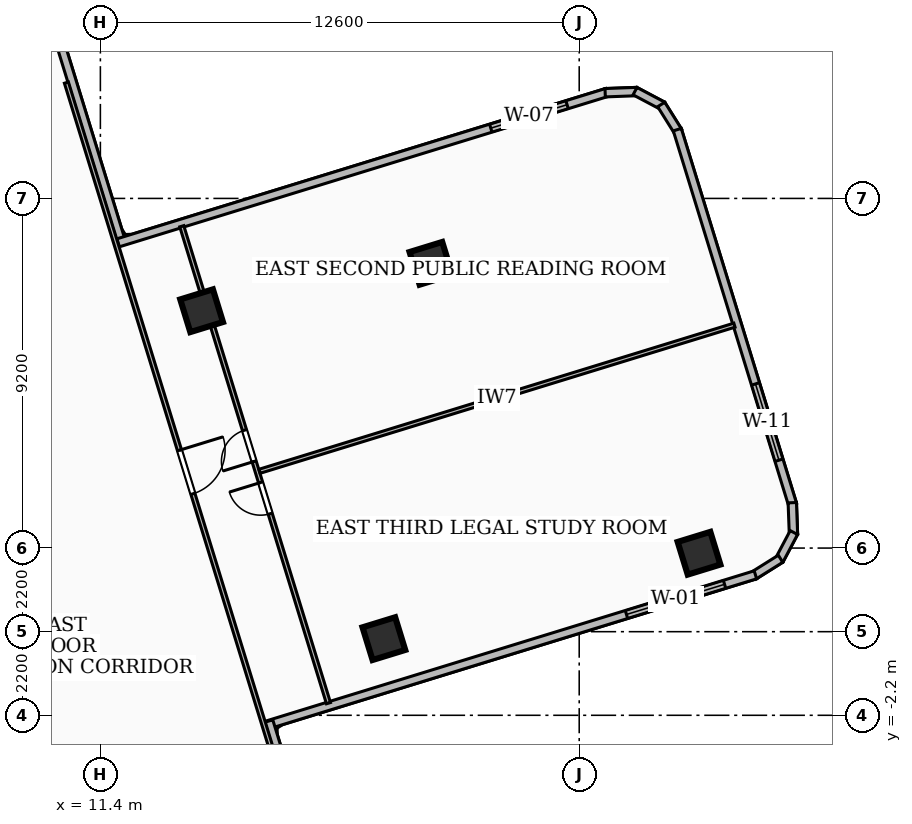
"""IFC4 building model, lengths in metres.
Left out: names, types, materials, properties, quantities, classifications, styles, units other than length and angle.
Written with IfcOpenShell. Run it as: python <this file> out.ifc"""

import sys

from ifc_helpers import new_model, si_unit, direction, frame, frame_2d, origin, origin_2d, place, context, subcontext, project, spatial, rectangle, extrude, element, fill, save


model = new_model("IFC4")
c1 = context("Model", 3, precision=1e-05, world=origin(), true_north=direction((0.0, 1.0)))
c2 = subcontext(c1, "Body", "Model", "MODEL_VIEW")
j1 = project(units=[si_unit("LENGTHUNIT", "METRE"), si_unit("PLANEANGLEUNIT", "RADIAN")], contexts=[c1])
p1 = place(None, origin())
s1 = spatial("IfcSite", under=j1, at=p1, CompositionType="ELEMENT")
p2 = place(p1, origin())
s2 = spatial("IfcBuilding", under=s1, at=p2, CompositionType="ELEMENT")
p3 = place(p2, frame((0.0, 0.0, 148.68)))
s3 = spatial("IfcBuildingStorey", under=s2, at=p3, CompositionType="ELEMENT", Elevation=148.68)
for number, where, z_axis, x_axis in (
    (1, (18.86, -0.183, 0.0), (0.0, 0.0, 1.0), (0.956, 0.294, 0.0)),
    (2, (14.064, 8.445, 0.0), (0.0, 0.0, 1.0), (0.956, 0.294, 0.0)),
    (3, (27.153, 2.064, 0.0), (0.0, 0.0, 1.0), (0.956, 0.294, 0.0)),
    (4, (20.098, 9.692, 0.0), (0.0, 0.0, 1.0), (0.956, 0.294, 0.0)),
):
    element("IfcColumn", number, at=place(p3, frame(where, z_axis=z_axis, x_axis=x_axis)), inside=s3, PredefinedType="COLUMN", context=c2, shape_type="SweptSolid", body=[
        extrude(rectangle(XDim=0.9, YDim=0.9, at=origin_2d()), origin(), (0.0, 0.0, 1.0), 3.6),
    ])
p4 = place(p3, frame((9.991, 16.634, 0.0), z_axis=(0.0, 0.0, 1.0), x_axis=(0.294002082259, -0.955804779036, 0.0)))
e5 = element("IfcWall", 5, at=p4, inside=s3, PredefinedType="SOLIDWALL", context=c2, shape_type="SweptSolid", body=[
    extrude(rectangle(XDim=6.759, YDim=0.22, at=frame_2d((3.379, 0.0))), origin(), (0.0, 0.0, 1.0), 3.32),
])
p5 = place(p3, frame((11.868, 10.232, 0.0), z_axis=(0.0, 0.0, 1.0), x_axis=(0.955802538335, 0.29400936671, 0.0)))
e6 = element("IfcWall", 6, at=p5, inside=s3, PredefinedType="SOLIDWALL", context=c2, shape_type="SweptSolid", body=[
    extrude(rectangle(XDim=13.459, YDim=0.22, at=frame_2d((6.729, 0.0))), origin(), (0.0, 0.0, 1.0), 3.32),
])
p6 = place(p5, frame((10.259, 0.0, 0.85)))
e7 = element("IfcOpeningElement", 7, at=p6, cuts=e6, PredefinedType="OPENING", context=c2, shape_type="SweptSolid", body=[
    extrude(rectangle(XDim=2.1, YDim=1.8, at=frame_2d((1.05, 0.9))), frame((0.0, 0.12, 0.0), z_axis=(0.0, -1.0, 0.0), x_axis=(1.0, 0.0, 0.0)), (0.0, 0.0, 1.0), 0.24),
])
p7 = place(p3, frame((24.683, 14.181, 0.0), z_axis=(0.0, 0.0, 1.0), x_axis=(0.999307996296, 0.037195813461, 0.0)))
e8 = element("IfcWall", 8, at=p7, inside=s3, PredefinedType="SOLIDWALL", context=c2, shape_type="SweptSolid", body=[
    extrude(rectangle(XDim=0.833, YDim=0.22, at=frame_2d((0.417, 0.0))), origin(), (0.0, 0.0, 1.0), 3.32),
])
p8 = place(p3, frame((25.469, 14.223, 0.0), z_axis=(0.0, 0.0, 1.0), x_axis=(0.883570434709, -0.468298288389, 0.0)))
e9 = element("IfcWall", 9, at=p8, inside=s3, PredefinedType="SOLIDWALL", context=c2, shape_type="SweptSolid", body=[
    extrude(rectangle(XDim=0.82, YDim=0.22, at=frame_2d((0.41, 0.0))), origin(), (0.0, 0.0, 1.0), 3.32),
])
p9 = place(p3, frame((26.158, 13.872, 0.0), z_axis=(0.0, 0.0, 1.0), x_axis=(0.531050540535, -0.847340146221, 0.0)))
e10 = element("IfcWall", 10, at=p9, inside=s3, PredefinedType="SOLIDWALL", context=c2, shape_type="SweptSolid", body=[
    extrude(rectangle(XDim=0.834, YDim=0.22, at=frame_2d((0.417, 0.0))), origin(), (0.0, 0.0, 1.0), 3.32),
])
p10 = place(p3, frame((26.581, 13.21, 0.0), z_axis=(0.0, 0.0, 1.0), x_axis=(0.293957854703, -0.955818382151, 0.0)))
e11 = element("IfcWall", 11, at=p10, inside=s3, PredefinedType="SOLIDWALL", context=c2, shape_type="SweptSolid", body=[
    extrude(rectangle(XDim=10.321, YDim=0.22, at=frame_2d((5.161, 0.0))), origin(), (0.0, 0.0, 1.0), 3.32),
])
p11 = place(p10, frame((7.0, 0.0, 0.85)))
e12 = element("IfcOpeningElement", 12, at=p11, cuts=e11, PredefinedType="OPENING", context=c2, shape_type="SweptSolid", body=[
    extrude(rectangle(XDim=2.1, YDim=1.6, at=frame_2d((1.05, 0.8))), frame((0.0, 0.12, 0.0), z_axis=(0.0, -1.0, 0.0), x_axis=(1.0, 0.0, 0.0)), (0.0, 0.0, 1.0), 0.24),
])
p12 = place(p3, frame((29.607, 3.394, 0.0), z_axis=(0.0, 0.0, 1.0), x_axis=(0.037195813461, -0.999307996296, 0.0)))
e13 = element("IfcWall", 13, at=p12, inside=s3, PredefinedType="SOLIDWALL", context=c2, shape_type="SweptSolid", body=[
    extrude(rectangle(XDim=0.833, YDim=0.22, at=frame_2d((0.417, 0.0))), origin(), (0.0, 0.0, 1.0), 3.32),
])
p13 = place(p3, frame((29.649, 2.608, 0.0), z_axis=(0.0, 0.0, 1.0), x_axis=(-0.468654126993, -0.883381746049, 0.0)))
e14 = element("IfcWall", 14, at=p13, inside=s3, PredefinedType="SOLIDWALL", context=c2, shape_type="SweptSolid", body=[
    extrude(rectangle(XDim=0.819, YDim=0.22, at=frame_2d((0.41, 0.0))), origin(), (0.0, 0.0, 1.0), 3.32),
])
p14 = place(p3, frame((29.298, 1.919, 0.0), z_axis=(0.0, 0.0, 1.0), x_axis=(-0.847141460322, -0.531367430506, 0.0)))
e15 = element("IfcWall", 15, at=p14, inside=s3, PredefinedType="SOLIDWALL", context=c2, shape_type="SweptSolid", body=[
    extrude(rectangle(XDim=0.833, YDim=0.22, at=frame_2d((0.417, 0.0))), origin(), (0.0, 0.0, 1.0), 3.32),
])
p15 = place(p3, frame((28.637, 1.496, 0.0), z_axis=(0.0, 0.0, 1.0), x_axis=(-0.955802538335, -0.29400936671, 0.0)))
e16 = element("IfcWall", 16, at=p15, inside=s3, PredefinedType="SOLIDWALL", context=c2, shape_type="SweptSolid", body=[
    extrude(rectangle(XDim=13.459, YDim=0.22, at=frame_2d((6.729, 0.0))), origin(), (0.0, 0.0, 1.0), 3.32),
])
p16 = place(p15, frame((0.85, 0.0, 0.85)))
e17 = element("IfcOpeningElement", 17, at=p16, cuts=e16, PredefinedType="OPENING", context=c2, shape_type="SweptSolid", body=[
    extrude(rectangle(XDim=2.7, YDim=2.1, at=frame_2d((1.35, 1.05))), frame((0.0, 0.12, 0.0), z_axis=(0.0, -1.0, 0.0), x_axis=(1.0, 0.0, 0.0)), (0.0, 0.0, 1.0), 0.24),
])
p17 = place(p3, frame((15.831, -2.351, 0.0), z_axis=(0.0, 0.0, 1.0), x_axis=(0.293958424126, -0.955818207028, 0.0)))
e18 = element("IfcWall", 18, at=p17, inside=s3, PredefinedType="SOLIDWALL", context=c2, shape_type="SweptSolid", body=[
    extrude(rectangle(XDim=6.059, YDim=0.22, at=frame_2d((3.029, 0.0))), origin(), (0.0, 0.0, 1.0), 3.32),
])
p18 = place(p3, frame((10.506, 14.447, 0.0), z_axis=(0.0, 0.0, 1.0), x_axis=(0.294033732643, -0.955795042919, 0.0)))
e19 = element("IfcWall", 19, at=p18, inside=s3, PredefinedType="PARTITIONING", context=c2, shape_type="SweptSolid", body=[
    extrude(rectangle(XDim=20.739, YDim=0.11, at=frame_2d((10.369, 0.0))), origin(), (0.0, 0.0, 1.0), 2.55),
])
p19 = place(p18, frame((10.12, 0.0, 0.0)))
e20 = element("IfcOpeningElement", 20, at=p19, cuts=e19, PredefinedType="OPENING", context=c2, shape_type="SweptSolid", body=[
    extrude(rectangle(XDim=1.2, YDim=2.1, at=frame_2d((0.6, 1.05))), frame((0.0, 0.065, 0.0), z_axis=(0.0, -1.0, 0.0), x_axis=(1.0, 0.0, 0.0)), (0.0, 0.0, 1.0), 0.13),
])
p20 = place(p3, frame((15.588, 4.22, 0.0), z_axis=(0.0, 0.0, 1.0), x_axis=(0.95578506432, 0.294066167422, 0.0)))
e21 = element("IfcWall", 21, at=p20, inside=s3, PredefinedType="PARTITIONING", context=c2, shape_type="SweptSolid", body=[
    extrude(rectangle(XDim=13.075, YDim=0.11, at=frame_2d((6.538, 0.0))), origin(), (0.0, 0.0, 1.0), 2.812),
])
p21 = place(p3, frame((17.402, -1.881, 0.0), z_axis=(0.0, 0.0, 1.0), x_axis=(-0.294006140437, 0.955803530745, 0.0)))
e22 = element("IfcWall", 22, at=p21, inside=s3, PredefinedType="PARTITIONING", context=c2, shape_type="SweptSolid", body=[
    extrude(rectangle(XDim=13.129, YDim=0.11, at=frame_2d((6.565, 0.0))), origin(), (0.0, 0.0, 1.0), 2.55),
])
p22 = place(p21, frame((5.215, 0.0, 0.0)))
e23 = element("IfcOpeningElement", 23, at=p22, cuts=e22, PredefinedType="OPENING", context=c2, shape_type="SweptSolid", body=[
    extrude(rectangle(XDim=0.86, YDim=2.04, at=frame_2d((0.43, 1.02))), frame((0.0, 0.065, 0.0), z_axis=(0.0, -1.0, 0.0), x_axis=(1.0, 0.0, 0.0)), (0.0, 0.0, 1.0), 0.13),
])
p23 = place(p21, frame((6.655, 0.0, 0.0)))
e24 = element("IfcOpeningElement", 24, at=p23, cuts=e22, PredefinedType="OPENING", context=c2, shape_type="SweptSolid", body=[
    extrude(rectangle(XDim=0.86, YDim=2.04, at=frame_2d((0.43, 1.02))), frame((0.0, 0.065, 0.0), z_axis=(0.0, -1.0, 0.0), x_axis=(1.0, 0.0, 0.0)), (0.0, 0.0, 1.0), 0.13),
])
p24 = place(p6, origin())
e25 = element("IfcWindow", 25, at=p24, inside=s3, PartitioningType="SINGLE_PANEL", PredefinedType="WINDOW", context=c2, shape_type="SweptSolid", body=[
    extrude(rectangle(XDim=2.1, YDim=1.8, at=frame_2d((1.05, 0.9))), frame((0.0, 0.03, 0.0), z_axis=(0.0, -1.0, 0.0), x_axis=(1.0, 0.0, 0.0)), (0.0, 0.0, 1.0), 0.06),
])
fill(e7, e25)
p25 = place(p11, origin())
e26 = element("IfcWindow", 26, at=p25, inside=s3, PartitioningType="SINGLE_PANEL", PredefinedType="WINDOW", context=c2, shape_type="SweptSolid", body=[
    extrude(rectangle(XDim=2.1, YDim=1.6, at=frame_2d((1.05, 0.8))), frame((0.0, 0.03, 0.0), z_axis=(0.0, -1.0, 0.0), x_axis=(1.0, 0.0, 0.0)), (0.0, 0.0, 1.0), 0.06),
])
fill(e12, e26)
p26 = place(p16, origin())
e27 = element("IfcWindow", 27, at=p26, inside=s3, PartitioningType="SINGLE_PANEL", PredefinedType="WINDOW", context=c2, shape_type="SweptSolid", body=[
    extrude(rectangle(XDim=2.7, YDim=2.1, at=frame_2d((1.35, 1.05))), frame((0.0, 0.03, 0.0), z_axis=(0.0, -1.0, 0.0), x_axis=(1.0, 0.0, 0.0)), (0.0, 0.0, 1.0), 0.06),
])
fill(e17, e27)
p27 = place(p19, origin())
e28 = element("IfcDoor", 28, at=p27, inside=s3, OperationType="SINGLE_SWING_LEFT", PredefinedType="DOOR", context=c2, shape_type="SweptSolid", body=[
    extrude(rectangle(XDim=1.2, YDim=2.1, at=frame_2d((0.6, 1.05))), frame((0.0, 0.025, 0.0), z_axis=(0.0, -1.0, 0.0), x_axis=(1.0, 0.0, 0.0)), (0.0, 0.0, 1.0), 0.05),
])
fill(e20, e28)
p28 = place(p22, origin())
e29 = element("IfcDoor", 29, at=p28, inside=s3, OperationType="SINGLE_SWING_RIGHT", PredefinedType="DOOR", context=c2, shape_type="SweptSolid", body=[
    extrude(rectangle(XDim=0.86, YDim=2.04, at=frame_2d((0.43, 1.02))), frame((0.0, 0.025, 0.0), z_axis=(0.0, -1.0, 0.0), x_axis=(1.0, 0.0, 0.0)), (0.0, 0.0, 1.0), 0.05),
])
fill(e23, e29)
p29 = place(p23, origin())
e30 = element("IfcDoor", 30, at=p29, inside=s3, OperationType="SINGLE_SWING_LEFT", PredefinedType="DOOR", context=c2, shape_type="SweptSolid", body=[
    extrude(rectangle(XDim=0.86, YDim=2.04, at=frame_2d((0.43, 1.02))), frame((0.0, 0.025, 0.0), z_axis=(0.0, -1.0, 0.0), x_axis=(1.0, 0.0, 0.0)), (0.0, 0.0, 1.0), 0.05),
])
fill(e24, e30)
save(model, sys.argv[1])
